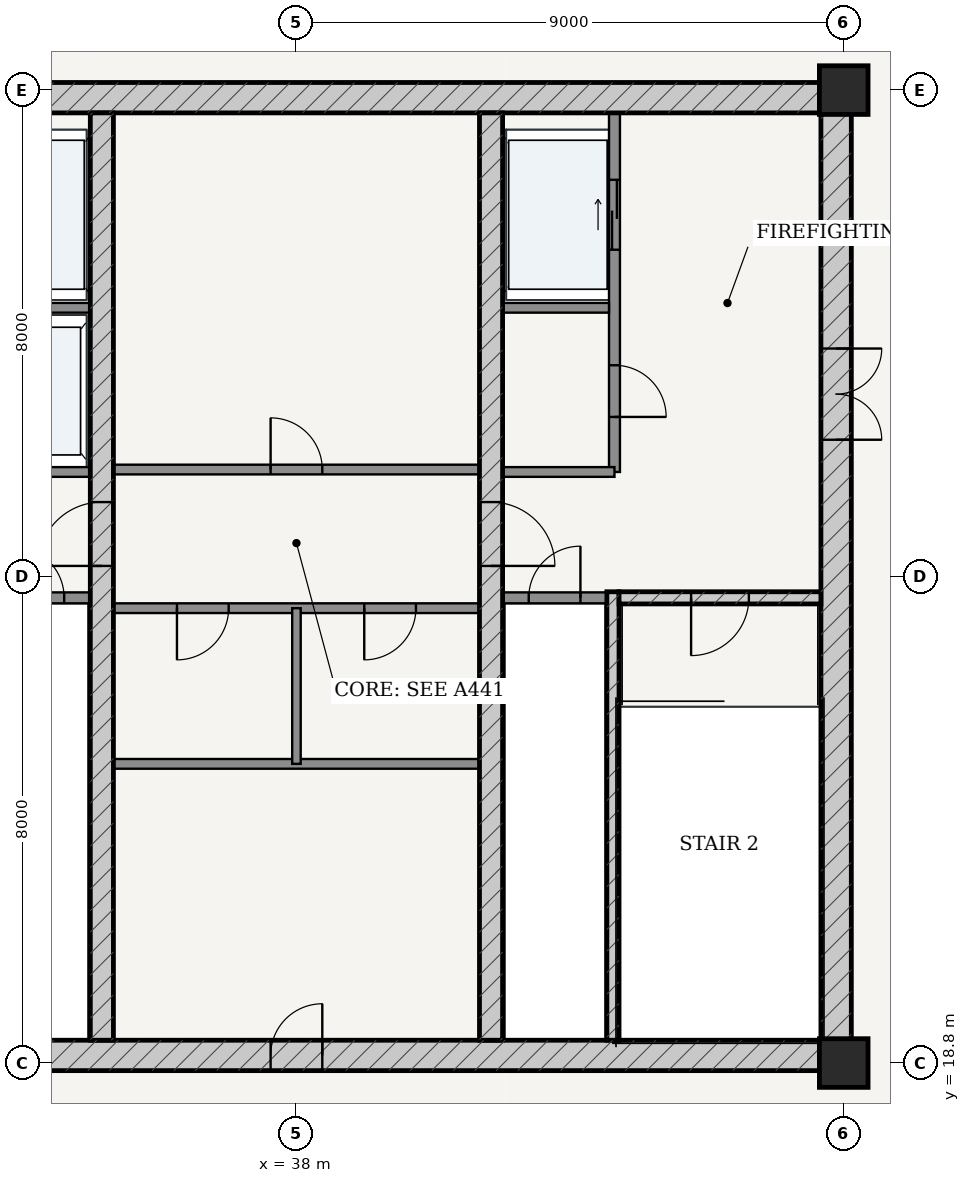
"""IFC4 building model, lengths in metres.
Left out: names, types, materials, properties, quantities, classifications, styles, units other than length and angle.
Written with IfcOpenShell. Run it as: python <this file> out.ifc"""

import sys

from ifc_helpers import new_model, si_unit, direction, frame, frame_2d, origin, origin_2d, place, context, subcontext, project, spatial, rectangle, extrude, source, transform, mapped, element, fill, save


model = new_model("IFC4")
c1 = context("Model", 3, precision=1e-05, world=origin(), true_north=direction((-0.2419218956, 0.970295726276)))
c2 = subcontext(c1, "Body", "Model", "MODEL_VIEW")
j1 = project(units=[si_unit("LENGTHUNIT", "METRE"), si_unit("PLANEANGLEUNIT", "RADIAN")], contexts=[c1])
p1 = place(None, origin())
s1 = spatial("IfcSite", under=j1, at=p1, CompositionType="ELEMENT")
p2 = place(p1, origin())
s2 = spatial("IfcBuilding", under=s1, at=p2, CompositionType="ELEMENT")
p3 = place(p2, frame((0.0, 0.0, 332.1)))
s3 = spatial("IfcBuildingStorey", under=s2, at=p3, CompositionType="ELEMENT", Elevation=332.1)
for number, where, z_axis, x_axis in (
    (1, (47.0, 18.8, 0.0), (0.0, 0.0, 1.0), (1.0, 0.0, 0.0)),
    (2, (47.0, 34.8, 0.0), (0.0, 0.0, 1.0), (1.0, 0.0, 0.0)),
):
    element("IfcColumn", number, at=place(p3, frame(where, z_axis=z_axis, x_axis=x_axis)), inside=s3, PredefinedType="COLUMN", context=c2, shape_type="SweptSolid", body=[
        extrude(rectangle(XDim=0.8, YDim=0.8, at=origin_2d()), origin(), (0.0, 0.0, 1.0), 5.2),
    ])
p4 = place(p3, frame((28.875, 18.925, 0.0), z_axis=(0.0, 0.0, 1.0), x_axis=(1.0, 0.0, 0.0)))
e3 = element("IfcWall", 3, at=p4, inside=s3, PredefinedType="SHEAR", context=c2, shape_type="SweptSolid", body=[
    extrude(rectangle(XDim=18.25, YDim=0.5, at=frame_2d((9.125, 0.0))), origin(), (0.0, 0.0, 1.0), 4.85),
])
p5 = place(p4, frame((8.7, 0.0, 0.0)))
e4 = element("IfcOpeningElement", 4, at=p5, cuts=e3, PredefinedType="OPENING", context=c2, shape_type="SweptSolid", body=[
    extrude(rectangle(XDim=0.85, YDim=2.1, at=frame_2d((0.425, 1.05))), frame((0.0, 0.26, 0.0), z_axis=(0.0, -1.0, 0.0), x_axis=(1.0, 0.0, 0.0)), (0.0, 0.0, 1.0), 0.52),
])
p6 = place(p3, frame((28.875, 34.675, 0.0), z_axis=(0.0, 0.0, 1.0), x_axis=(1.0, 0.0, 0.0)))
e5 = element("IfcWall", 5, at=p6, inside=s3, PredefinedType="SHEAR", context=c2, shape_type="SweptSolid", body=[
    extrude(rectangle(XDim=18.25, YDim=0.5, at=frame_2d((9.125, 0.0))), origin(), (0.0, 0.0, 1.0), 4.85),
])
p7 = place(p3, frame((46.875, 19.175, 0.0), z_axis=(0.0, 0.0, 1.0), x_axis=(0.0, 1.0, 0.0)))
e6 = element("IfcWall", 6, at=p7, inside=s3, PredefinedType="SHEAR", context=c2, shape_type="SweptSolid", body=[
    extrude(rectangle(XDim=15.25, YDim=0.5, at=frame_2d((7.625, 0.0))), origin(), (0.0, 0.0, 1.0), 4.85),
])
p8 = place(p7, frame((9.875, 0.0, 0.0)))
e7 = element("IfcOpeningElement", 7, at=p8, cuts=e6, PredefinedType="OPENING", context=c2, shape_type="SweptSolid", body=[
    extrude(rectangle(XDim=1.5, YDim=2.2, at=frame_2d((0.75, 1.1))), frame((0.0, 0.26, 0.0), z_axis=(0.0, -1.0, 0.0), x_axis=(1.0, 0.0, 0.0)), (0.0, 0.0, 1.0), 0.52),
])
p9 = place(p3, frame((43.205, 19.175, 0.0), z_axis=(0.0, 0.0, 1.0), x_axis=(0.0, 1.0, 0.0)))
e8 = element("IfcWall", 8, at=p9, inside=s3, PredefinedType="SOLIDWALL", context=c2, shape_type="SweptSolid", body=[
    extrude(rectangle(XDim=7.375, YDim=0.2, at=frame_2d((3.688, 0.0))), origin(), (0.0, 0.0, 1.0), 4.85),
])
p10 = place(p3, frame((43.305, 26.45, 0.0), z_axis=(0.0, 0.0, 1.0), x_axis=(1.0, 0.0, 0.0)))
e9 = element("IfcWall", 9, at=p10, inside=s3, PredefinedType="SOLIDWALL", context=c2, shape_type="SweptSolid", body=[
    extrude(rectangle(XDim=3.32, YDim=0.2, at=frame_2d((1.66, 0.0))), origin(), (0.0, 0.0, 1.0), 4.85),
])
p11 = place(p10, frame((1.185, 0.0, 0.0)))
e10 = element("IfcOpeningElement", 10, at=p11, cuts=e9, PredefinedType="OPENING", context=c2, shape_type="SweptSolid", body=[
    extrude(rectangle(XDim=0.95, YDim=2.15, at=frame_2d((0.475, 1.075))), frame((0.0, 0.11, 0.0), z_axis=(0.0, -1.0, 0.0), x_axis=(1.0, 0.0, 0.0)), (0.0, 0.0, 1.0), 0.22),
])
p12 = place(p3, frame((34.8, 19.175, 0.0), z_axis=(0.0, 0.0, 1.0), x_axis=(0.0, 1.0, 0.0)))
e11 = element("IfcWall", 11, at=p12, inside=s3, PredefinedType="SHEAR", context=c2, shape_type="SweptSolid", body=[
    extrude(rectangle(XDim=15.25, YDim=0.38, at=frame_2d((7.625, 0.0))), origin(), (0.0, 0.0, 1.0), 4.85),
])
p13 = place(p12, frame((7.8, 0.0, 0.0)))
e12 = element("IfcOpeningElement", 12, at=p13, cuts=e11, PredefinedType="OPENING", context=c2, shape_type="SweptSolid", body=[
    extrude(rectangle(XDim=1.05, YDim=2.15, at=frame_2d((0.525, 1.075))), frame((0.0, 0.2, 0.0), z_axis=(0.0, -1.0, 0.0), x_axis=(1.0, 0.0, 0.0)), (0.0, 0.0, 1.0), 0.4),
])
p14 = place(p3, frame((41.2, 19.175, 0.0), z_axis=(0.0, 0.0, 1.0), x_axis=(0.0, 1.0, 0.0)))
e13 = element("IfcWall", 13, at=p14, inside=s3, PredefinedType="SHEAR", context=c2, shape_type="SweptSolid", body=[
    extrude(rectangle(XDim=15.25, YDim=0.38, at=frame_2d((7.625, 0.0))), origin(), (0.0, 0.0, 1.0), 4.85),
])
p15 = place(p14, frame((7.8, 0.0, 0.0)))
e14 = element("IfcOpeningElement", 14, at=p15, cuts=e13, PredefinedType="OPENING", context=c2, shape_type="SweptSolid", body=[
    extrude(rectangle(XDim=1.05, YDim=2.15, at=frame_2d((0.525, 1.075))), frame((0.0, 0.2, 0.0), z_axis=(0.0, -1.0, 0.0), x_axis=(1.0, 0.0, 0.0)), (0.0, 0.0, 1.0), 0.4),
])
p16 = place(p3, frame((32.9, 26.45, 0.0), z_axis=(0.0, 0.0, 1.0), x_axis=(1.0, 0.0, 0.0)))
e15 = element("IfcWall", 15, at=p16, inside=s3, PredefinedType="PARTITIONING", context=c2, shape_type="SweptSolid", body=[
    extrude(rectangle(XDim=1.71, YDim=0.18, at=frame_2d((0.855, 0.0))), origin(), (0.0, 0.0, 1.0), 4.85),
])
p17 = place(p16, frame((0.43, 0.0, 0.0)))
e16 = element("IfcOpeningElement", 16, at=p17, cuts=e15, PredefinedType="OPENING", context=c2, shape_type="SweptSolid", body=[
    extrude(rectangle(XDim=0.85, YDim=2.1, at=frame_2d((0.425, 1.05))), frame((0.0, 0.1, 0.0), z_axis=(0.0, -1.0, 0.0), x_axis=(1.0, 0.0, 0.0)), (0.0, 0.0, 1.0), 0.2),
])
p18 = place(p3, frame((41.39, 26.45, 0.0), z_axis=(0.0, 0.0, 1.0), x_axis=(1.0, 0.0, 0.0)))
e17 = element("IfcWall", 17, at=p18, inside=s3, PredefinedType="PARTITIONING", context=c2, shape_type="SweptSolid", body=[
    extrude(rectangle(XDim=1.71, YDim=0.18, at=frame_2d((0.855, 0.0))), origin(), (0.0, 0.0, 1.0), 4.85),
])
p19 = place(p18, frame((0.43, 0.0, 0.0)))
e18 = element("IfcOpeningElement", 18, at=p19, cuts=e17, PredefinedType="OPENING", context=c2, shape_type="SweptSolid", body=[
    extrude(rectangle(XDim=0.85, YDim=2.1, at=frame_2d((0.425, 1.05))), frame((0.0, 0.1, 0.0), z_axis=(0.0, -1.0, 0.0), x_axis=(1.0, 0.0, 0.0)), (0.0, 0.0, 1.0), 0.2),
])
p20 = place(p3, frame((32.86, 31.22, 0.0), z_axis=(0.0, 0.0, 1.0), x_axis=(1.0, 0.0, 0.0)))
e19 = element("IfcWall", 19, at=p20, inside=s3, PredefinedType="PARTITIONING", context=c2, shape_type="SweptSolid", body=[
    extrude(rectangle(XDim=1.75, YDim=0.16, at=frame_2d((0.875, 0.0))), origin(), (0.0, 0.0, 1.0), 4.85),
])
p21 = place(p3, frame((32.77, 28.52, 0.0), z_axis=(0.0, 0.0, 1.0), x_axis=(1.0, 0.0, 0.0)))
e20 = element("IfcWall", 20, at=p21, inside=s3, PredefinedType="PARTITIONING", context=c2, shape_type="SweptSolid", body=[
    extrude(rectangle(XDim=1.84, YDim=0.16, at=frame_2d((0.92, 0.0))), origin(), (0.0, 0.0, 1.0), 4.85),
])
p22 = place(p3, frame((43.23, 28.52, 0.0), z_axis=(0.0, 0.0, 1.0), x_axis=(0.0, 1.0, 0.0)))
e21 = element("IfcWall", 21, at=p22, inside=s3, PredefinedType="PARTITIONING", context=c2, shape_type="SweptSolid", body=[
    extrude(rectangle(XDim=5.905, YDim=0.18, at=frame_2d((2.953, 0.0))), origin(), (0.0, 0.0, 1.0), 4.85),
])
p23 = place(p22, frame((0.905, 0.0, 0.0)))
e22 = element("IfcOpeningElement", 22, at=p23, cuts=e21, PredefinedType="OPENING", context=c2, shape_type="SweptSolid", body=[
    extrude(rectangle(XDim=0.85, YDim=2.1, at=frame_2d((0.425, 1.05))), frame((0.0, 0.1, 0.0), z_axis=(0.0, -1.0, 0.0), x_axis=(1.0, 0.0, 0.0)), (0.0, 0.0, 1.0), 0.2),
])
p24 = place(p22, frame((3.655, 0.0, 0.0)))
e23 = element("IfcOpeningElement", 23, at=p24, cuts=e21, PredefinedType="OPENING", context=c2, shape_type="SweptSolid", body=[
    extrude(rectangle(XDim=1.15, YDim=2.2, at=frame_2d((0.575, 1.1))), frame((0.0, 0.1, 0.0), z_axis=(0.0, -1.0, 0.0), x_axis=(1.0, 0.0, 0.0)), (0.0, 0.0, 1.0), 0.2),
])
p25 = place(p3, frame((41.39, 31.22, 0.0), z_axis=(0.0, 0.0, 1.0), x_axis=(1.0, 0.0, 0.0)))
e24 = element("IfcWall", 24, at=p25, inside=s3, PredefinedType="PARTITIONING", context=c2, shape_type="SweptSolid", body=[
    extrude(rectangle(XDim=1.75, YDim=0.16, at=frame_2d((0.875, 0.0))), origin(), (0.0, 0.0, 1.0), 4.85),
])
p26 = place(p3, frame((41.39, 28.52, 0.0), z_axis=(0.0, 0.0, 1.0), x_axis=(1.0, 0.0, 0.0)))
e25 = element("IfcWall", 25, at=p26, inside=s3, PredefinedType="PARTITIONING", context=c2, shape_type="SweptSolid", body=[
    extrude(rectangle(XDim=1.84, YDim=0.16, at=frame_2d((0.92, 0.0))), origin(), (0.0, 0.0, 1.0), 4.85),
])
p27 = place(p3, frame((34.99, 28.56, 0.0), z_axis=(0.0, 0.0, 1.0), x_axis=(1.0, 0.0, 0.0)))
e26 = element("IfcWall", 26, at=p27, inside=s3, PredefinedType="PARTITIONING", context=c2, shape_type="SweptSolid", body=[
    extrude(rectangle(XDim=6.02, YDim=0.16, at=frame_2d((3.01, 0.0))), origin(), (0.0, 0.0, 1.0), 4.85),
])
p28 = place(p27, frame((2.585, 0.0, 0.0)))
e27 = element("IfcOpeningElement", 27, at=p28, cuts=e26, PredefinedType="OPENING", context=c2, shape_type="SweptSolid", body=[
    extrude(rectangle(XDim=0.85, YDim=2.1, at=frame_2d((0.425, 1.05))), frame((0.0, 0.09, 0.0), z_axis=(0.0, -1.0, 0.0), x_axis=(1.0, 0.0, 0.0)), (0.0, 0.0, 1.0), 0.18),
])
p29 = place(p3, frame((34.99, 26.28, 0.0), z_axis=(0.0, 0.0, 1.0), x_axis=(1.0, 0.0, 0.0)))
e28 = element("IfcWall", 28, at=p29, inside=s3, PredefinedType="PARTITIONING", context=c2, shape_type="SweptSolid", body=[
    extrude(rectangle(XDim=6.02, YDim=0.16, at=frame_2d((3.01, 0.0))), origin(), (0.0, 0.0, 1.0), 4.85),
])
p30 = place(p29, frame((1.045, 0.0, 0.0)))
e29 = element("IfcOpeningElement", 29, at=p30, cuts=e28, PredefinedType="OPENING", context=c2, shape_type="SweptSolid", body=[
    extrude(rectangle(XDim=0.85, YDim=2.1, at=frame_2d((0.425, 1.05))), frame((0.0, 0.09, 0.0), z_axis=(0.0, -1.0, 0.0), x_axis=(1.0, 0.0, 0.0)), (0.0, 0.0, 1.0), 0.18),
])
p31 = place(p29, frame((4.125, 0.0, 0.0)))
e30 = element("IfcOpeningElement", 30, at=p31, cuts=e28, PredefinedType="OPENING", context=c2, shape_type="SweptSolid", body=[
    extrude(rectangle(XDim=0.85, YDim=2.1, at=frame_2d((0.425, 1.05))), frame((0.0, 0.09, 0.0), z_axis=(0.0, -1.0, 0.0), x_axis=(1.0, 0.0, 0.0)), (0.0, 0.0, 1.0), 0.18),
])
p32 = place(p3, frame((34.99, 23.72, 0.0), z_axis=(0.0, 0.0, 1.0), x_axis=(1.0, 0.0, 0.0)))
e31 = element("IfcWall", 31, at=p32, inside=s3, PredefinedType="PARTITIONING", context=c2, shape_type="SweptSolid", body=[
    extrude(rectangle(XDim=6.02, YDim=0.16, at=frame_2d((3.01, 0.0))), origin(), (0.0, 0.0, 1.0), 4.85),
])
p33 = place(p3, frame((38.0, 23.72, 0.0), z_axis=(0.0, 0.0, 1.0), x_axis=(0.0, 1.0, 0.0)))
e32 = element("IfcWall", 32, at=p33, inside=s3, PredefinedType="PARTITIONING", context=c2, shape_type="SweptSolid", body=[
    extrude(rectangle(XDim=2.56, YDim=0.14, at=frame_2d((1.28, 0.0))), origin(), (0.0, 0.0, 1.0), 4.85),
])
m1 = source(origin(), c2, "Body", "SweptSolid", [
    extrude(rectangle(XDim=1.5, YDim=2.2, at=frame_2d((0.75, 1.1))), frame((0.0, 0.025, 0.0), z_axis=(0.0, -1.0, 0.0), x_axis=(1.0, 0.0, 0.0)), (0.0, 0.0, 1.0), 0.05),
])
p34 = place(p8, frame((1.5, 0.0, 0.0), z_axis=(0.0, 0.0, 1.0), x_axis=(-1.0, 0.0, 0.0)))
e33 = element("IfcDoor", 33, at=p34, inside=s3, OperationType="DOUBLE_DOOR_SINGLE_SWING", PredefinedType="DOOR", context=c2, shape_type="MappedRepresentation", body=[
    mapped(m1, transform((0.0, 0.0, 0.0), scale=1.0)),
])
fill(e7, e33)
m2 = source(origin(), c2, "Body", "SweptSolid", [
    extrude(rectangle(XDim=1.05, YDim=2.15, at=frame_2d((0.525, 1.075))), frame((0.0, 0.025, 0.0), z_axis=(0.0, -1.0, 0.0), x_axis=(1.0, 0.0, 0.0)), (0.0, 0.0, 1.0), 0.05),
])
p35 = place(p13, origin())
e34 = element("IfcDoor", 34, at=p35, inside=s3, OperationType="SINGLE_SWING_LEFT", PredefinedType="DOOR", context=c2, shape_type="MappedRepresentation", body=[
    mapped(m2, transform((0.0, 0.0, 0.0), scale=1.0)),
])
fill(e12, e34)
p36 = place(p15, frame((1.05, 0.0, 0.0), z_axis=(0.0, 0.0, 1.0), x_axis=(-1.0, 0.0, 0.0)))
e35 = element("IfcDoor", 35, at=p36, inside=s3, OperationType="SINGLE_SWING_RIGHT", PredefinedType="DOOR", context=c2, shape_type="MappedRepresentation", body=[
    mapped(m2, transform((0.0, 0.0, 0.0), scale=1.0)),
])
fill(e14, e35)
m3 = source(origin(), c2, "Body", "SweptSolid", [
    extrude(rectangle(XDim=0.95, YDim=2.15, at=frame_2d((0.475, 1.075))), frame((0.0, 0.025, 0.0), z_axis=(0.0, -1.0, 0.0), x_axis=(1.0, 0.0, 0.0)), (0.0, 0.0, 1.0), 0.05),
])
p37 = place(p11, frame((0.95, 0.0, 0.0), z_axis=(0.0, 0.0, 1.0), x_axis=(-1.0, 0.0, 0.0)))
e36 = element("IfcDoor", 36, at=p37, inside=s3, OperationType="SINGLE_SWING_RIGHT", PredefinedType="DOOR", context=c2, shape_type="MappedRepresentation", body=[
    mapped(m3, transform((0.0, 0.0, 0.0), scale=1.0)),
])
fill(e10, e36)
m4 = source(origin(), c2, "Body", "SweptSolid", [
    extrude(rectangle(XDim=0.85, YDim=2.1, at=frame_2d((0.425, 1.05))), frame((0.0, 0.025, 0.0), z_axis=(0.0, -1.0, 0.0), x_axis=(1.0, 0.0, 0.0)), (0.0, 0.0, 1.0), 0.05),
])
p38 = place(p17, origin())
e37 = element("IfcDoor", 37, at=p38, inside=s3, OperationType="SINGLE_SWING_LEFT", PredefinedType="DOOR", context=c2, shape_type="MappedRepresentation", body=[
    mapped(m4, transform((0.0, 0.0, 0.0), scale=1.0)),
])
fill(e16, e37)
p39 = place(p19, origin())
e38 = element("IfcDoor", 38, at=p39, inside=s3, OperationType="SINGLE_SWING_RIGHT", PredefinedType="DOOR", context=c2, shape_type="MappedRepresentation", body=[
    mapped(m4, transform((0.0, 0.0, 0.0), scale=1.0)),
])
fill(e18, e38)
p40 = place(p23, frame((0.85, 0.0, 0.0), z_axis=(0.0, 0.0, 1.0), x_axis=(-1.0, 0.0, 0.0)))
e39 = element("IfcDoor", 39, at=p40, inside=s3, OperationType="SINGLE_SWING_RIGHT", PredefinedType="DOOR", context=c2, shape_type="MappedRepresentation", body=[
    mapped(m4, transform((0.0, 0.0, 0.0), scale=1.0)),
])
fill(e22, e39)
p41 = place(p28, origin())
e40 = element("IfcDoor", 40, at=p41, inside=s3, OperationType="SINGLE_SWING_LEFT", PredefinedType="DOOR", context=c2, shape_type="MappedRepresentation", body=[
    mapped(m4, transform((0.0, 0.0, 0.0), scale=1.0)),
])
fill(e27, e40)
p42 = place(p30, frame((0.85, 0.0, 0.0), z_axis=(0.0, 0.0, 1.0), x_axis=(-1.0, 0.0, 0.0)))
e41 = element("IfcDoor", 41, at=p42, inside=s3, OperationType="SINGLE_SWING_RIGHT", PredefinedType="DOOR", context=c2, shape_type="MappedRepresentation", body=[
    mapped(m4, transform((0.0, 0.0, 0.0), scale=1.0)),
])
fill(e29, e41)
p43 = place(p31, frame((0.85, 0.0, 0.0), z_axis=(0.0, 0.0, 1.0), x_axis=(-1.0, 0.0, 0.0)))
e42 = element("IfcDoor", 42, at=p43, inside=s3, OperationType="SINGLE_SWING_RIGHT", PredefinedType="DOOR", context=c2, shape_type="MappedRepresentation", body=[
    mapped(m4, transform((0.0, 0.0, 0.0), scale=1.0)),
])
fill(e30, e42)
p44 = place(p5, origin())
e43 = element("IfcDoor", 43, at=p44, inside=s3, OperationType="SINGLE_SWING_RIGHT", PredefinedType="DOOR", context=c2, shape_type="MappedRepresentation", body=[
    mapped(m4, transform((0.0, 0.0, 0.0), scale=1.0)),
])
fill(e4, e43)
m5 = source(origin(), c2, "Body", "SweptSolid", [
    extrude(rectangle(XDim=1.15, YDim=2.2, at=frame_2d((0.575, 1.1))), frame((0.0, 0.025, 0.0), z_axis=(0.0, -1.0, 0.0), x_axis=(1.0, 0.0, 0.0)), (0.0, 0.0, 1.0), 0.05),
])
p45 = place(p24, origin())
e44 = element("IfcDoor", 44, at=p45, inside=s3, OperationType="DOUBLE_DOOR_SLIDING", PredefinedType="DOOR", context=c2, shape_type="MappedRepresentation", body=[
    mapped(m5, transform((0.0, 0.0, 0.0), scale=1.0)),
])
fill(e23, e44)
save(model, sys.argv[1])
